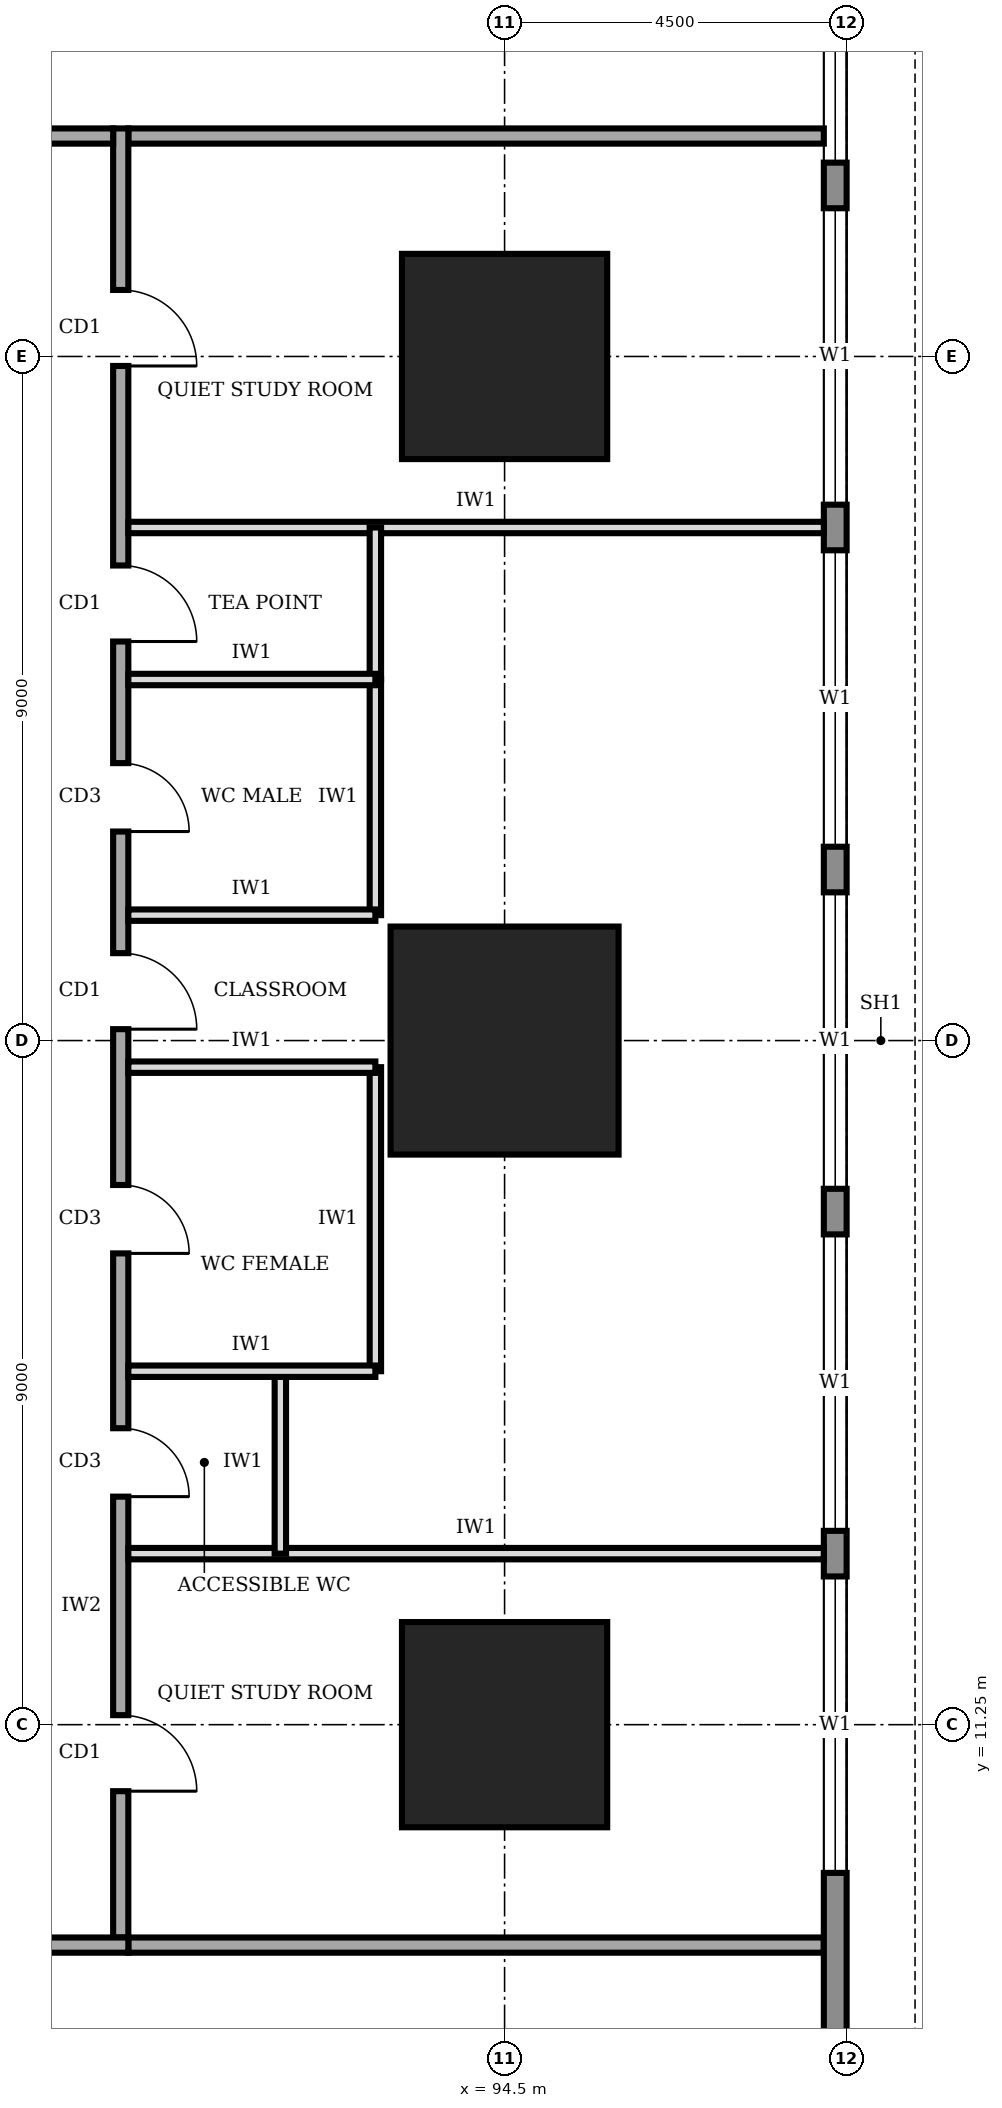
"""IFC4 building model, lengths in metres.
Left out: names, types, materials, properties, quantities, classifications, styles, units other than length and angle.
Written with IfcOpenShell. Run it as: python <this file> out.ifc"""

import sys

from ifc_helpers import new_model, si_unit, direction, frame, frame_2d, origin, origin_2d, place, context, subcontext, project, spatial, rectangle, extrude, element, fill, save


model = new_model("IFC4")
c1 = context("Model", 3, precision=1e-05, world=origin(), true_north=direction((0.0, 1.0)))
c2 = subcontext(c1, "Body", "Model", "MODEL_VIEW")
j1 = project(units=[si_unit("LENGTHUNIT", "METRE"), si_unit("PLANEANGLEUNIT", "RADIAN")], contexts=[c1])
p1 = place(None, origin())
s1 = spatial("IfcSite", under=j1, at=p1, CompositionType="ELEMENT")
p2 = place(p1, origin())
s2 = spatial("IfcBuilding", under=s1, at=p2, CompositionType="ELEMENT")
p3 = place(p2, frame((0.0, 0.0, 37.0)))
s3 = spatial("IfcBuildingStorey", under=s2, at=p3, CompositionType="ELEMENT", Elevation=37.0)
p4 = place(p3, frame((94.5, 11.25, 0.0), z_axis=(0.0, 0.0, 1.0), x_axis=(1.0, 0.0, 0.0)))
e1 = element("IfcColumn", 1, at=p4, inside=s3, PredefinedType="COLUMN", context=c2, shape_type="SweptSolid", body=[
    extrude(rectangle(XDim=2.7, YDim=2.7, at=origin_2d()), origin(), (0.0, 0.0, 1.0), 4.0),
])
p5 = place(p3, frame((94.5, 20.25, 0.0), z_axis=(0.0, 0.0, 1.0), x_axis=(1.0, 0.0, 0.0)))
e2 = element("IfcColumn", 2, at=p5, inside=s3, PredefinedType="COLUMN", context=c2, shape_type="SweptSolid", body=[
    extrude(rectangle(XDim=3.0, YDim=3.0, at=origin_2d()), origin(), (0.0, 0.0, 1.0), 4.0),
])
p6 = place(p3, frame((94.5, 29.25, 0.0), z_axis=(0.0, 0.0, 1.0), x_axis=(1.0, 0.0, 0.0)))
e3 = element("IfcColumn", 3, at=p6, inside=s3, PredefinedType="COLUMN", context=c2, shape_type="SweptSolid", body=[
    extrude(rectangle(XDim=2.7, YDim=2.7, at=origin_2d()), origin(), (0.0, 0.0, 1.0), 4.0),
])
p7 = place(p3, frame((98.85, 4.52, 0.0), z_axis=(0.0, 0.0, 1.0), x_axis=(0.0, 1.0, 0.0)))
e4 = element("IfcWall", 4, at=p7, inside=s3, PredefinedType="STANDARD", context=c2, shape_type="SweptSolid", body=[
    extrude(rectangle(XDim=31.46, YDim=0.3, at=frame_2d((15.73, 0.0))), origin(), (0.0, 0.0, 1.0), 3.75),
])
p8 = place(p7, frame((4.78, 0.0, 0.9)))
e5 = element("IfcOpeningElement", 5, at=p8, cuts=e4, PredefinedType="OPENING", context=c2, shape_type="SweptSolid", body=[
    extrude(rectangle(XDim=3.9, YDim=2.2, at=frame_2d((1.95, 1.1))), frame((0.0, 0.16, 0.0), z_axis=(0.0, -1.0, 0.0), x_axis=(1.0, 0.0, 0.0)), (0.0, 0.0, 1.0), 0.32),
])
p9 = place(p7, frame((9.28, 0.0, 0.9)))
e6 = element("IfcOpeningElement", 6, at=p9, cuts=e4, PredefinedType="OPENING", context=c2, shape_type="SweptSolid", body=[
    extrude(rectangle(XDim=3.9, YDim=2.2, at=frame_2d((1.95, 1.1))), frame((0.0, 0.16, 0.0), z_axis=(0.0, -1.0, 0.0), x_axis=(1.0, 0.0, 0.0)), (0.0, 0.0, 1.0), 0.32),
])
p10 = place(p7, frame((13.78, 0.0, 0.9)))
e7 = element("IfcOpeningElement", 7, at=p10, cuts=e4, PredefinedType="OPENING", context=c2, shape_type="SweptSolid", body=[
    extrude(rectangle(XDim=3.9, YDim=2.2, at=frame_2d((1.95, 1.1))), frame((0.0, 0.16, 0.0), z_axis=(0.0, -1.0, 0.0), x_axis=(1.0, 0.0, 0.0)), (0.0, 0.0, 1.0), 0.32),
])
p11 = place(p7, frame((18.28, 0.0, 0.9)))
e8 = element("IfcOpeningElement", 8, at=p11, cuts=e4, PredefinedType="OPENING", context=c2, shape_type="SweptSolid", body=[
    extrude(rectangle(XDim=3.9, YDim=2.2, at=frame_2d((1.95, 1.1))), frame((0.0, 0.16, 0.0), z_axis=(0.0, -1.0, 0.0), x_axis=(1.0, 0.0, 0.0)), (0.0, 0.0, 1.0), 0.32),
])
p12 = place(p7, frame((22.78, 0.0, 0.9)))
e9 = element("IfcOpeningElement", 9, at=p12, cuts=e4, PredefinedType="OPENING", context=c2, shape_type="SweptSolid", body=[
    extrude(rectangle(XDim=3.9, YDim=2.2, at=frame_2d((1.95, 1.1))), frame((0.0, 0.16, 0.0), z_axis=(0.0, -1.0, 0.0), x_axis=(1.0, 0.0, 0.0)), (0.0, 0.0, 1.0), 0.32),
])
p13 = place(p7, frame((27.28, 0.0, 0.9)))
e10 = element("IfcOpeningElement", 10, at=p13, cuts=e4, PredefinedType="OPENING", context=c2, shape_type="SweptSolid", body=[
    extrude(rectangle(XDim=3.9, YDim=2.2, at=frame_2d((1.95, 1.1))), frame((0.0, 0.16, 0.0), z_axis=(0.0, -1.0, 0.0), x_axis=(1.0, 0.0, 0.0)), (0.0, 0.0, 1.0), 0.32),
])
p14 = place(p3, frame((72.65, 8.35, 0.0), z_axis=(0.0, 0.0, 1.0), x_axis=(1.0, 0.0, 0.0)))
e11 = element("IfcWall", 11, at=p14, inside=s3, PredefinedType="SOLIDWALL", context=c2, shape_type="SweptSolid", body=[
    extrude(rectangle(XDim=16.9, YDim=0.2, at=frame_2d((8.45, 0.0))), origin(), (0.0, 0.0, 1.0), 3.75),
])
p15 = place(p14, frame((1.325, 0.0, 0.0)))
e12 = element("IfcOpeningElement", 12, at=p15, cuts=e11, PredefinedType="OPENING", context=c2, shape_type="SweptSolid", body=[
    extrude(rectangle(XDim=1.0, YDim=2.1, at=frame_2d((0.5, 1.05))), frame((0.0, 0.11, 0.0), z_axis=(0.0, -1.0, 0.0), x_axis=(1.0, 0.0, 0.0)), (0.0, 0.0, 1.0), 0.22),
])
p16 = place(p14, frame((5.6, 0.0, 0.0)))
e13 = element("IfcOpeningElement", 13, at=p16, cuts=e11, PredefinedType="OPENING", context=c2, shape_type="SweptSolid", body=[
    extrude(rectangle(XDim=1.0, YDim=2.1, at=frame_2d((0.5, 1.05))), frame((0.0, 0.11, 0.0), z_axis=(0.0, -1.0, 0.0), x_axis=(1.0, 0.0, 0.0)), (0.0, 0.0, 1.0), 0.22),
])
p17 = place(p14, frame((11.925, 0.0, 0.0)))
e14 = element("IfcOpeningElement", 14, at=p17, cuts=e11, PredefinedType="OPENING", context=c2, shape_type="SweptSolid", body=[
    extrude(rectangle(XDim=1.4, YDim=2.1, at=frame_2d((0.7, 1.05))), frame((0.0, 0.11, 0.0), z_axis=(0.0, -1.0, 0.0), x_axis=(1.0, 0.0, 0.0)), (0.0, 0.0, 1.0), 0.22),
])
p18 = place(p3, frame((89.45, 8.45, 0.0), z_axis=(0.0, 0.0, 1.0), x_axis=(0.0, 1.0, 0.0)))
e15 = element("IfcWall", 15, at=p18, inside=s3, PredefinedType="SOLIDWALL", context=c2, shape_type="SweptSolid", body=[
    extrude(rectangle(XDim=23.8, YDim=0.2, at=frame_2d((11.9, 0.0))), origin(), (0.0, 0.0, 1.0), 3.75),
])
p19 = place(p18, frame((1.925, 0.0, 0.0)))
e16 = element("IfcOpeningElement", 16, at=p19, cuts=e15, PredefinedType="OPENING", context=c2, shape_type="SweptSolid", body=[
    extrude(rectangle(XDim=1.0, YDim=2.1, at=frame_2d((0.5, 1.05))), frame((0.0, 0.11, 0.0), z_axis=(0.0, -1.0, 0.0), x_axis=(1.0, 0.0, 0.0)), (0.0, 0.0, 1.0), 0.22),
])
p20 = place(p18, frame((5.8, 0.0, 0.0)))
e17 = element("IfcOpeningElement", 17, at=p20, cuts=e15, PredefinedType="OPENING", context=c2, shape_type="SweptSolid", body=[
    extrude(rectangle(XDim=0.9, YDim=2.1, at=frame_2d((0.45, 1.05))), frame((0.0, 0.11, 0.0), z_axis=(0.0, -1.0, 0.0), x_axis=(1.0, 0.0, 0.0)), (0.0, 0.0, 1.0), 0.22),
])
p21 = place(p18, frame((9.0, 0.0, 0.0)))
e18 = element("IfcOpeningElement", 18, at=p21, cuts=e15, PredefinedType="OPENING", context=c2, shape_type="SweptSolid", body=[
    extrude(rectangle(XDim=0.9, YDim=2.1, at=frame_2d((0.45, 1.05))), frame((0.0, 0.11, 0.0), z_axis=(0.0, -1.0, 0.0), x_axis=(1.0, 0.0, 0.0)), (0.0, 0.0, 1.0), 0.22),
])
p22 = place(p18, frame((14.55, 0.0, 0.0)))
e19 = element("IfcOpeningElement", 19, at=p22, cuts=e15, PredefinedType="OPENING", context=c2, shape_type="SweptSolid", body=[
    extrude(rectangle(XDim=0.9, YDim=2.1, at=frame_2d((0.45, 1.05))), frame((0.0, 0.11, 0.0), z_axis=(0.0, -1.0, 0.0), x_axis=(1.0, 0.0, 0.0)), (0.0, 0.0, 1.0), 0.22),
])
p23 = place(p18, frame((17.05, 0.0, 0.0)))
e20 = element("IfcOpeningElement", 20, at=p23, cuts=e15, PredefinedType="OPENING", context=c2, shape_type="SweptSolid", body=[
    extrude(rectangle(XDim=1.0, YDim=2.1, at=frame_2d((0.5, 1.05))), frame((0.0, 0.11, 0.0), z_axis=(0.0, -1.0, 0.0), x_axis=(1.0, 0.0, 0.0)), (0.0, 0.0, 1.0), 0.22),
])
p24 = place(p18, frame((11.95, 0.0, 0.0)))
e21 = element("IfcOpeningElement", 21, at=p24, cuts=e15, PredefinedType="OPENING", context=c2, shape_type="SweptSolid", body=[
    extrude(rectangle(XDim=1.0, YDim=2.1, at=frame_2d((0.5, 1.05))), frame((0.0, 0.11, 0.0), z_axis=(0.0, -1.0, 0.0), x_axis=(1.0, 0.0, 0.0)), (0.0, 0.0, 1.0), 0.22),
])
p25 = place(p18, frame((20.675, 0.0, 0.0)))
e22 = element("IfcOpeningElement", 22, at=p25, cuts=e15, PredefinedType="OPENING", context=c2, shape_type="SweptSolid", body=[
    extrude(rectangle(XDim=1.0, YDim=2.1, at=frame_2d((0.5, 1.05))), frame((0.0, 0.11, 0.0), z_axis=(0.0, -1.0, 0.0), x_axis=(1.0, 0.0, 0.0)), (0.0, 0.0, 1.0), 0.22),
])
p26 = place(p3, frame((89.35, 32.15, 0.0), z_axis=(0.0, 0.0, 1.0), x_axis=(-1.0, 0.0, 0.0)))
e23 = element("IfcWall", 23, at=p26, inside=s3, PredefinedType="SOLIDWALL", context=c2, shape_type="SweptSolid", body=[
    extrude(rectangle(XDim=16.9, YDim=0.2, at=frame_2d((8.45, 0.0))), origin(), (0.0, 0.0, 1.0), 3.75),
])
p27 = place(p26, frame((14.375, 0.0, 0.0)))
e24 = element("IfcOpeningElement", 24, at=p27, cuts=e23, PredefinedType="OPENING", context=c2, shape_type="SweptSolid", body=[
    extrude(rectangle(XDim=1.0, YDim=2.1, at=frame_2d((0.5, 1.05))), frame((0.0, 0.11, 0.0), z_axis=(0.0, -1.0, 0.0), x_axis=(1.0, 0.0, 0.0)), (0.0, 0.0, 1.0), 0.22),
])
p28 = place(p26, frame((7.85, 0.0, 0.0)))
e25 = element("IfcOpeningElement", 25, at=p28, cuts=e23, PredefinedType="OPENING", context=c2, shape_type="SweptSolid", body=[
    extrude(rectangle(XDim=1.0, YDim=2.1, at=frame_2d((0.5, 1.05))), frame((0.0, 0.11, 0.0), z_axis=(0.0, -1.0, 0.0), x_axis=(1.0, 0.0, 0.0)), (0.0, 0.0, 1.0), 0.22),
])
p29 = place(p26, frame((1.325, 0.0, 0.0)))
e26 = element("IfcOpeningElement", 26, at=p29, cuts=e23, PredefinedType="OPENING", context=c2, shape_type="SweptSolid", body=[
    extrude(rectangle(XDim=1.0, YDim=2.1, at=frame_2d((0.5, 1.05))), frame((0.0, 0.11, 0.0), z_axis=(0.0, -1.0, 0.0), x_axis=(1.0, 0.0, 0.0)), (0.0, 0.0, 1.0), 0.22),
])
for number, where, z_axis, x_axis in (
    (27, (89.55, 8.35, 0.0), (0.0, 0.0, 1.0), (1.0, 0.0, 0.0)),
    (28, (89.55, 32.15, 0.0), (0.0, 0.0, 1.0), (1.0, 0.0, 0.0)),
):
    element("IfcWall", number, at=place(p3, frame(where, z_axis=z_axis, x_axis=x_axis)), inside=s3, PredefinedType="SOLIDWALL", context=c2, shape_type="SweptSolid", body=[
        extrude(rectangle(XDim=9.15, YDim=0.2, at=frame_2d((4.575, 0.0))), origin(), (0.0, 0.0, 1.0), 3.75),
    ])
for number, where, z_axis, x_axis in (
    (29, (89.55, 13.5, 0.0), (0.0, 0.0, 1.0), (1.0, 0.0, 0.0)),
    (30, (89.55, 27.0, 0.0), (0.0, 0.0, 1.0), (1.0, 0.0, 0.0)),
):
    element("IfcWall", number, at=place(p3, frame(where, z_axis=z_axis, x_axis=x_axis)), inside=s3, PredefinedType="PARTITIONING", context=c2, shape_type="SweptSolid", body=[
        extrude(rectangle(XDim=9.15, YDim=0.15, at=frame_2d((4.575, 0.0))), origin(), (0.0, 0.0, 1.0), 3.75),
    ])
p30 = place(p3, frame((89.55, 15.9, 0.0), z_axis=(0.0, 0.0, 1.0), x_axis=(1.0, 0.0, 0.0)))
e31 = element("IfcWall", 31, at=p30, inside=s3, PredefinedType="PARTITIONING", context=c2, shape_type="SweptSolid", body=[
    extrude(rectangle(XDim=3.25, YDim=0.15, at=frame_2d((1.625, 0.0))), origin(), (0.0, 0.0, 1.0), 3.75),
])
p31 = place(p3, frame((89.55, 19.9, 0.0), z_axis=(0.0, 0.0, 1.0), x_axis=(1.0, 0.0, 0.0)))
e32 = element("IfcWall", 32, at=p31, inside=s3, PredefinedType="PARTITIONING", context=c2, shape_type="SweptSolid", body=[
    extrude(rectangle(XDim=3.25, YDim=0.15, at=frame_2d((1.625, 0.0))), origin(), (0.0, 0.0, 1.0), 2.85),
])
for number, where, z_axis, x_axis in (
    (33, (89.55, 21.9, 0.0), (0.0, 0.0, 1.0), (1.0, 0.0, 0.0)),
    (34, (89.55, 25.0, 0.0), (0.0, 0.0, 1.0), (1.0, 0.0, 0.0)),
):
    element("IfcWall", number, at=place(p3, frame(where, z_axis=z_axis, x_axis=x_axis)), inside=s3, PredefinedType="PARTITIONING", context=c2, shape_type="SweptSolid", body=[
        extrude(rectangle(XDim=3.25, YDim=0.15, at=frame_2d((1.625, 0.0))), origin(), (0.0, 0.0, 1.0), 3.75),
    ])
p32 = place(p3, frame((91.55, 13.5, 0.0), z_axis=(0.0, 0.0, 1.0), x_axis=(0.0, 1.0, 0.0)))
e35 = element("IfcWall", 35, at=p32, inside=s3, PredefinedType="PARTITIONING", context=c2, shape_type="SweptSolid", body=[
    extrude(rectangle(XDim=2.4, YDim=0.15, at=frame_2d((1.2, 0.0))), origin(), (0.0, 0.0, 1.0), 3.75),
])
p33 = place(p3, frame((92.8, 15.9, 0.0), z_axis=(0.0, 0.0, 1.0), x_axis=(0.0, 1.0, 0.0)))
e36 = element("IfcWall", 36, at=p33, inside=s3, PredefinedType="PARTITIONING", context=c2, shape_type="SweptSolid", body=[
    extrude(rectangle(XDim=4.0, YDim=0.15, at=frame_2d((2.0, 0.0))), origin(), (0.0, 0.0, 1.0), 3.75),
])
p34 = place(p3, frame((92.8, 21.9, 0.0), z_axis=(0.0, 0.0, 1.0), x_axis=(0.0, 1.0, 0.0)))
e37 = element("IfcWall", 37, at=p34, inside=s3, PredefinedType="PARTITIONING", context=c2, shape_type="SweptSolid", body=[
    extrude(rectangle(XDim=3.1, YDim=0.15, at=frame_2d((1.55, 0.0))), origin(), (0.0, 0.0, 1.0), 3.75),
])
p35 = place(p3, frame((92.8, 25.0, 0.0), z_axis=(0.0, 0.0, 1.0), x_axis=(0.0, 1.0, 0.0)))
e38 = element("IfcWall", 38, at=p35, inside=s3, PredefinedType="PARTITIONING", context=c2, shape_type="SweptSolid", body=[
    extrude(rectangle(XDim=2.0, YDim=0.15, at=frame_2d((1.0, 0.0))), origin(), (0.0, 0.0, 1.0), 3.75),
])
p36 = place(p8, origin())
e39 = element("IfcWindow", 39, at=p36, inside=s3, PartitioningType="SINGLE_PANEL", PredefinedType="WINDOW", context=c2, shape_type="SweptSolid", body=[
    extrude(rectangle(XDim=3.9, YDim=2.2, at=frame_2d((1.95, 1.1))), frame((0.0, 0.03, 0.0), z_axis=(0.0, -1.0, 0.0), x_axis=(1.0, 0.0, 0.0)), (0.0, 0.0, 1.0), 0.06),
])
fill(e5, e39)
p37 = place(p9, origin())
e40 = element("IfcWindow", 40, at=p37, inside=s3, PartitioningType="SINGLE_PANEL", PredefinedType="WINDOW", context=c2, shape_type="SweptSolid", body=[
    extrude(rectangle(XDim=3.9, YDim=2.2, at=frame_2d((1.95, 1.1))), frame((0.0, 0.03, 0.0), z_axis=(0.0, -1.0, 0.0), x_axis=(1.0, 0.0, 0.0)), (0.0, 0.0, 1.0), 0.06),
])
fill(e6, e40)
p38 = place(p10, origin())
e41 = element("IfcWindow", 41, at=p38, inside=s3, PartitioningType="SINGLE_PANEL", PredefinedType="WINDOW", context=c2, shape_type="SweptSolid", body=[
    extrude(rectangle(XDim=3.9, YDim=2.2, at=frame_2d((1.95, 1.1))), frame((0.0, 0.03, 0.0), z_axis=(0.0, -1.0, 0.0), x_axis=(1.0, 0.0, 0.0)), (0.0, 0.0, 1.0), 0.06),
])
fill(e7, e41)
p39 = place(p11, origin())
e42 = element("IfcWindow", 42, at=p39, inside=s3, PartitioningType="SINGLE_PANEL", PredefinedType="WINDOW", context=c2, shape_type="SweptSolid", body=[
    extrude(rectangle(XDim=3.9, YDim=2.2, at=frame_2d((1.95, 1.1))), frame((0.0, 0.03, 0.0), z_axis=(0.0, -1.0, 0.0), x_axis=(1.0, 0.0, 0.0)), (0.0, 0.0, 1.0), 0.06),
])
fill(e8, e42)
p40 = place(p12, origin())
e43 = element("IfcWindow", 43, at=p40, inside=s3, PartitioningType="SINGLE_PANEL", PredefinedType="WINDOW", context=c2, shape_type="SweptSolid", body=[
    extrude(rectangle(XDim=3.9, YDim=2.2, at=frame_2d((1.95, 1.1))), frame((0.0, 0.03, 0.0), z_axis=(0.0, -1.0, 0.0), x_axis=(1.0, 0.0, 0.0)), (0.0, 0.0, 1.0), 0.06),
])
fill(e9, e43)
p41 = place(p13, origin())
e44 = element("IfcWindow", 44, at=p41, inside=s3, PartitioningType="SINGLE_PANEL", PredefinedType="WINDOW", context=c2, shape_type="SweptSolid", body=[
    extrude(rectangle(XDim=3.9, YDim=2.2, at=frame_2d((1.95, 1.1))), frame((0.0, 0.03, 0.0), z_axis=(0.0, -1.0, 0.0), x_axis=(1.0, 0.0, 0.0)), (0.0, 0.0, 1.0), 0.06),
])
fill(e10, e44)
p42 = place(p19, frame((1.0, 0.0, 0.0), z_axis=(0.0, 0.0, 1.0), x_axis=(-1.0, 0.0, 0.0)))
e45 = element("IfcDoor", 45, at=p42, inside=s3, OperationType="SINGLE_SWING_RIGHT", PredefinedType="DOOR", context=c2, shape_type="SweptSolid", body=[
    extrude(rectangle(XDim=1.0, YDim=2.1, at=frame_2d((0.5, 1.05))), frame((0.0, 0.025, 0.0), z_axis=(0.0, -1.0, 0.0), x_axis=(1.0, 0.0, 0.0)), (0.0, 0.0, 1.0), 0.05),
])
fill(e16, e45)
p43 = place(p20, frame((0.9, 0.0, 0.0), z_axis=(0.0, 0.0, 1.0), x_axis=(-1.0, 0.0, 0.0)))
e46 = element("IfcDoor", 46, at=p43, inside=s3, OperationType="SINGLE_SWING_RIGHT", PredefinedType="DOOR", context=c2, shape_type="SweptSolid", body=[
    extrude(rectangle(XDim=0.9, YDim=2.1, at=frame_2d((0.45, 1.05))), frame((0.0, 0.025, 0.0), z_axis=(0.0, -1.0, 0.0), x_axis=(1.0, 0.0, 0.0)), (0.0, 0.0, 1.0), 0.05),
])
fill(e17, e46)
p44 = place(p21, frame((0.9, 0.0, 0.0), z_axis=(0.0, 0.0, 1.0), x_axis=(-1.0, 0.0, 0.0)))
e47 = element("IfcDoor", 47, at=p44, inside=s3, OperationType="SINGLE_SWING_RIGHT", PredefinedType="DOOR", context=c2, shape_type="SweptSolid", body=[
    extrude(rectangle(XDim=0.9, YDim=2.1, at=frame_2d((0.45, 1.05))), frame((0.0, 0.025, 0.0), z_axis=(0.0, -1.0, 0.0), x_axis=(1.0, 0.0, 0.0)), (0.0, 0.0, 1.0), 0.05),
])
fill(e18, e47)
p45 = place(p22, frame((0.9, 0.0, 0.0), z_axis=(0.0, 0.0, 1.0), x_axis=(-1.0, 0.0, 0.0)))
e48 = element("IfcDoor", 48, at=p45, inside=s3, OperationType="SINGLE_SWING_RIGHT", PredefinedType="DOOR", context=c2, shape_type="SweptSolid", body=[
    extrude(rectangle(XDim=0.9, YDim=2.1, at=frame_2d((0.45, 1.05))), frame((0.0, 0.025, 0.0), z_axis=(0.0, -1.0, 0.0), x_axis=(1.0, 0.0, 0.0)), (0.0, 0.0, 1.0), 0.05),
])
fill(e19, e48)
p46 = place(p23, frame((1.0, 0.0, 0.0), z_axis=(0.0, 0.0, 1.0), x_axis=(-1.0, 0.0, 0.0)))
e49 = element("IfcDoor", 49, at=p46, inside=s3, OperationType="SINGLE_SWING_RIGHT", PredefinedType="DOOR", context=c2, shape_type="SweptSolid", body=[
    extrude(rectangle(XDim=1.0, YDim=2.1, at=frame_2d((0.5, 1.05))), frame((0.0, 0.025, 0.0), z_axis=(0.0, -1.0, 0.0), x_axis=(1.0, 0.0, 0.0)), (0.0, 0.0, 1.0), 0.05),
])
fill(e20, e49)
p47 = place(p24, frame((1.0, 0.0, 0.0), z_axis=(0.0, 0.0, 1.0), x_axis=(-1.0, 0.0, 0.0)))
e50 = element("IfcDoor", 50, at=p47, inside=s3, OperationType="SINGLE_SWING_RIGHT", PredefinedType="DOOR", context=c2, shape_type="SweptSolid", body=[
    extrude(rectangle(XDim=1.0, YDim=2.1, at=frame_2d((0.5, 1.05))), frame((0.0, 0.025, 0.0), z_axis=(0.0, -1.0, 0.0), x_axis=(1.0, 0.0, 0.0)), (0.0, 0.0, 1.0), 0.05),
])
fill(e21, e50)
p48 = place(p25, frame((1.0, 0.0, 0.0), z_axis=(0.0, 0.0, 1.0), x_axis=(-1.0, 0.0, 0.0)))
e51 = element("IfcDoor", 51, at=p48, inside=s3, OperationType="SINGLE_SWING_RIGHT", PredefinedType="DOOR", context=c2, shape_type="SweptSolid", body=[
    extrude(rectangle(XDim=1.0, YDim=2.1, at=frame_2d((0.5, 1.05))), frame((0.0, 0.025, 0.0), z_axis=(0.0, -1.0, 0.0), x_axis=(1.0, 0.0, 0.0)), (0.0, 0.0, 1.0), 0.05),
])
fill(e22, e51)
save(model, sys.argv[1])
